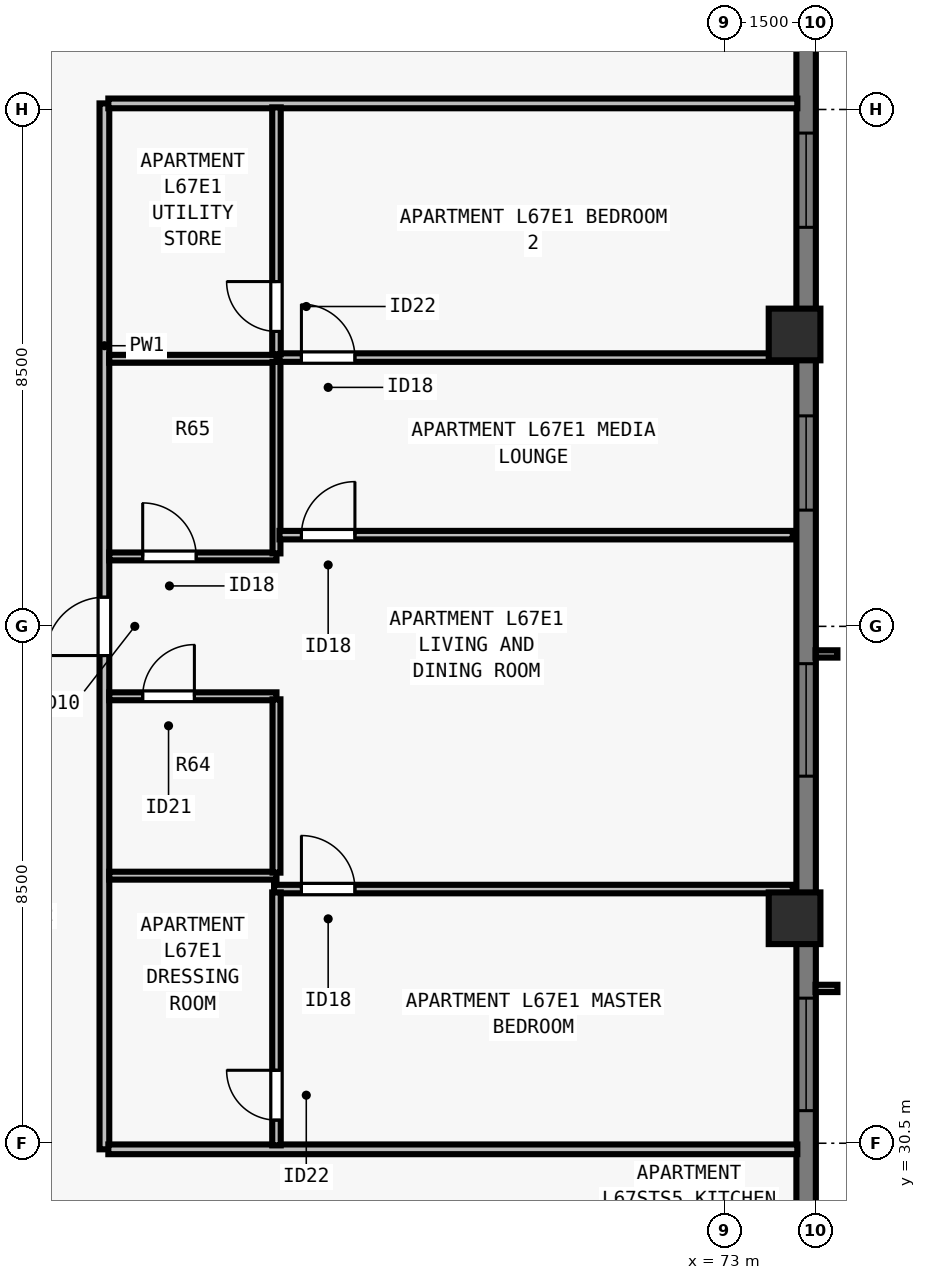
"""IFC4 building model, lengths in metres.
Left out: names, types, materials, properties, quantities, classifications, styles, units other than length and angle.
Written with IfcOpenShell. Run it as: python <this file> out.ifc"""

import sys

from ifc_helpers import new_model, si_unit, direction, frame, frame_2d, origin, origin_2d, place, context, subcontext, project, spatial, rectangle, extrude, element, fill, save


model = new_model("IFC4")
c1 = context("Model", 3, precision=1e-05, world=origin(), true_north=direction((0.0, 1.0)))
c2 = subcontext(c1, "Body", "Model", "MODEL_VIEW")
j1 = project(units=[si_unit("LENGTHUNIT", "METRE"), si_unit("PLANEANGLEUNIT", "RADIAN")], contexts=[c1])
p1 = place(None, origin())
s1 = spatial("IfcSite", under=j1, at=p1, CompositionType="ELEMENT")
p2 = place(p1, origin())
s2 = spatial("IfcBuilding", under=s1, at=p2, CompositionType="ELEMENT")
p3 = place(p2, frame((0.0, 0.0, 244.5)))
s3 = spatial("IfcBuildingStorey", under=s2, at=p3, CompositionType="ELEMENT", Elevation=244.5)
for number, where, z_axis, x_axis in (
    (1, (74.15, 34.2, 0.0), (0.0, 0.0, 1.0), (0.0, 1.0, 0.0)),
    (2, (74.15, 43.8, 0.0), (0.0, 0.0, 1.0), (0.0, 1.0, 0.0)),
):
    element("IfcColumn", number, at=place(p3, frame(where, z_axis=z_axis, x_axis=x_axis)), inside=s3, PredefinedType="COLUMN", context=c2, shape_type="SweptSolid", body=[
        extrude(rectangle(XDim=0.85, YDim=0.85, at=origin_2d()), origin(), (0.0, 0.0, 1.0), 3.5),
    ])
p4 = place(p3, frame((74.34, 56.5, 0.0), z_axis=(0.0, 0.0, 1.0), x_axis=(0.0, -1.0, 0.0)))
e3 = element("IfcWall", 3, at=p4, inside=s3, PredefinedType="SOLIDWALL", context=c2, shape_type="SweptSolid", body=[
    extrude(rectangle(XDim=34.702, YDim=0.32, at=frame_2d((17.351, 0.0))), origin(), (0.0, 0.0, 1.0), 3.29),
])
p5 = place(p4, frame((9.388, 0.0, 0.8)))
e4 = element("IfcOpeningElement", 4, at=p5, cuts=e3, PredefinedType="OPENING", context=c2, shape_type="SweptSolid", body=[
    extrude(rectangle(XDim=1.55, YDim=1.678, at=frame_2d((0.775, 0.839))), frame((0.0, 0.17, 0.0), z_axis=(0.0, -1.0, 0.0), x_axis=(1.0, 0.0, 0.0)), (0.0, 0.0, 1.0), 0.34),
])
p6 = place(p4, frame((14.038, 0.0, 0.8)))
e5 = element("IfcOpeningElement", 5, at=p6, cuts=e3, PredefinedType="OPENING", context=c2, shape_type="SweptSolid", body=[
    extrude(rectangle(XDim=1.55, YDim=1.678, at=frame_2d((0.775, 0.839))), frame((0.0, 0.17, 0.0), z_axis=(0.0, -1.0, 0.0), x_axis=(1.0, 0.0, 0.0)), (0.0, 0.0, 1.0), 0.34),
])
p7 = place(p4, frame((18.114, 0.0, 0.8)))
e6 = element("IfcOpeningElement", 6, at=p7, cuts=e3, PredefinedType="OPENING", context=c2, shape_type="SweptSolid", body=[
    extrude(rectangle(XDim=1.85, YDim=1.678, at=frame_2d((0.925, 0.839))), frame((0.0, 0.17, 0.0), z_axis=(0.0, -1.0, 0.0), x_axis=(1.0, 0.0, 0.0)), (0.0, 0.0, 1.0), 0.34),
])
p8 = place(p4, frame((23.614, 0.0, 0.8)))
e7 = element("IfcOpeningElement", 7, at=p8, cuts=e3, PredefinedType="OPENING", context=c2, shape_type="SweptSolid", body=[
    extrude(rectangle(XDim=1.85, YDim=1.678, at=frame_2d((0.925, 0.839))), frame((0.0, 0.17, 0.0), z_axis=(0.0, -1.0, 0.0), x_axis=(1.0, 0.0, 0.0)), (0.0, 0.0, 1.0), 0.34),
])
p9 = place(p4, frame((30.95, 0.0, 0.8)))
e8 = element("IfcOpeningElement", 8, at=p9, cuts=e3, PredefinedType="OPENING", context=c2, shape_type="SweptSolid", body=[
    extrude(rectangle(XDim=0.9, YDim=1.678, at=frame_2d((0.45, 0.839))), frame((0.0, 0.17, 0.0), z_axis=(0.0, -1.0, 0.0), x_axis=(1.0, 0.0, 0.0)), (0.0, 0.0, 1.0), 0.34),
])
p10 = place(p3, frame((62.8, 30.4, 0.0), z_axis=(0.0, 0.0, 1.0), x_axis=(0.0, 1.0, 0.0)))
e9 = element("IfcWall", 9, at=p10, inside=s3, PredefinedType="PARTITIONING", context=c2, shape_type="SweptSolid", body=[
    extrude(rectangle(XDim=17.2, YDim=0.16, at=frame_2d((8.6, 0.0))), origin(), (0.0, 0.0, 1.0), 3.29),
])
p11 = place(p10, frame((8.12, 0.0, 0.0)))
e10 = element("IfcOpeningElement", 10, at=p11, cuts=e9, PredefinedType="OPENING", context=c2, shape_type="SweptSolid", body=[
    extrude(rectangle(XDim=0.96, YDim=2.18, at=frame_2d((0.48, 1.09))), frame((0.0, 0.09, 0.0), z_axis=(0.0, -1.0, 0.0), x_axis=(1.0, 0.0, 0.0)), (0.0, 0.0, 1.0), 0.18),
])
for number, where, z_axis, x_axis in (
    (11, (62.865, 30.4, 0.0), (0.0, 0.0, 1.0), (1.0, 0.0, 0.0)),
    (12, (62.865, 47.6, 0.0), (0.0, 0.0, 1.0), (1.0, 0.0, 0.0)),
):
    element("IfcWall", number, at=place(p3, frame(where, z_axis=z_axis, x_axis=x_axis)), inside=s3, PredefinedType="PARTITIONING", context=c2, shape_type="SweptSolid", body=[
        extrude(rectangle(XDim=11.33, YDim=0.16, at=frame_2d((5.665, 0.0))), origin(), (0.0, 0.0, 1.0), 3.29),
    ])
p12 = place(p3, frame((62.88, 34.9, 0.0), z_axis=(0.0, 0.0, 1.0), x_axis=(1.0, 0.0, 0.0)))
e13 = element("IfcWall", 13, at=p12, inside=s3, PredefinedType="PLUMBINGWALL", context=c2, shape_type="SweptSolid", body=[
    extrude(rectangle(XDim=2.75, YDim=0.13, at=frame_2d((1.375, 0.0))), origin(), (0.0, 0.0, 1.0), 3.29),
])
p13 = place(p3, frame((62.88, 37.85, 0.0), z_axis=(0.0, 0.0, 1.0), x_axis=(1.0, 0.0, 0.0)))
e14 = element("IfcWall", 14, at=p13, inside=s3, PredefinedType="PLUMBINGWALL", context=c2, shape_type="SweptSolid", body=[
    extrude(rectangle(XDim=2.75, YDim=0.13, at=frame_2d((1.375, 0.0))), origin(), (0.0, 0.0, 1.0), 3.29),
])
p14 = place(p13, frame((0.55, 0.0, 0.0)))
e15 = element("IfcOpeningElement", 15, at=p14, cuts=e14, PredefinedType="OPENING", context=c2, shape_type="SweptSolid", body=[
    extrude(rectangle(XDim=0.85, YDim=2.08, at=frame_2d((0.425, 1.04))), frame((0.0, 0.075, 0.0), z_axis=(0.0, -1.0, 0.0), x_axis=(1.0, 0.0, 0.0)), (0.0, 0.0, 1.0), 0.15),
])
p15 = place(p3, frame((65.63, 34.95, 0.0), z_axis=(0.0, 0.0, 1.0), x_axis=(0.0, 1.0, 0.0)))
e16 = element("IfcWall", 16, at=p15, inside=s3, PredefinedType="PLUMBINGWALL", context=c2, shape_type="SweptSolid", body=[
    extrude(rectangle(XDim=2.85, YDim=0.13, at=frame_2d((1.425, 0.0))), origin(), (0.0, 0.0, 1.0), 3.29),
])
p16 = place(p3, frame((62.88, 43.4, 0.0), z_axis=(0.0, 0.0, 1.0), x_axis=(1.0, 0.0, 0.0)))
e17 = element("IfcWall", 17, at=p16, inside=s3, PredefinedType="PLUMBINGWALL", context=c2, shape_type="SweptSolid", body=[
    extrude(rectangle(XDim=2.75, YDim=0.13, at=frame_2d((1.375, 0.0))), origin(), (0.0, 0.0, 1.0), 3.29),
])
p17 = place(p3, frame((62.88, 40.15, 0.0), z_axis=(0.0, 0.0, 1.0), x_axis=(1.0, 0.0, 0.0)))
e18 = element("IfcWall", 18, at=p17, inside=s3, PredefinedType="PLUMBINGWALL", context=c2, shape_type="SweptSolid", body=[
    extrude(rectangle(XDim=2.75, YDim=0.13, at=frame_2d((1.375, 0.0))), origin(), (0.0, 0.0, 1.0), 3.29),
])
p18 = place(p17, frame((0.55, 0.0, 0.0)))
e19 = element("IfcOpeningElement", 19, at=p18, cuts=e18, PredefinedType="OPENING", context=c2, shape_type="SweptSolid", body=[
    extrude(rectangle(XDim=0.88, YDim=2.1, at=frame_2d((0.44, 1.05))), frame((0.0, 0.075, 0.0), z_axis=(0.0, -1.0, 0.0), x_axis=(1.0, 0.0, 0.0)), (0.0, 0.0, 1.0), 0.15),
])
p19 = place(p3, frame((65.63, 40.2, 0.0), z_axis=(0.0, 0.0, 1.0), x_axis=(0.0, 1.0, 0.0)))
e20 = element("IfcWall", 20, at=p19, inside=s3, PredefinedType="PLUMBINGWALL", context=c2, shape_type="SweptSolid", body=[
    extrude(rectangle(XDim=3.15, YDim=0.13, at=frame_2d((1.575, 0.0))), origin(), (0.0, 0.0, 1.0), 3.29),
])
p20 = place(p3, frame((65.59, 34.68, 0.0), z_axis=(0.0, 0.0, 1.0), x_axis=(1.0, 0.0, 0.0)))
e21 = element("IfcWall", 21, at=p20, inside=s3, PredefinedType="PARTITIONING", context=c2, shape_type="SweptSolid", body=[
    extrude(rectangle(XDim=8.53, YDim=0.14, at=frame_2d((4.265, 0.0))), origin(), (0.0, 0.0, 1.0), 3.29),
])
p21 = place(p20, frame((0.45, 0.0, 0.0)))
e22 = element("IfcOpeningElement", 22, at=p21, cuts=e21, PredefinedType="OPENING", context=c2, shape_type="SweptSolid", body=[
    extrude(rectangle(XDim=0.88, YDim=2.1, at=frame_2d((0.44, 1.05))), frame((0.0, 0.08, 0.0), z_axis=(0.0, -1.0, 0.0), x_axis=(1.0, 0.0, 0.0)), (0.0, 0.0, 1.0), 0.16),
])
p22 = place(p3, frame((65.63, 30.465, 0.0), z_axis=(0.0, 0.0, 1.0), x_axis=(0.0, 1.0, 0.0)))
e23 = element("IfcWall", 23, at=p22, inside=s3, PredefinedType="PARTITIONING", context=c2, shape_type="SweptSolid", body=[
    extrude(rectangle(XDim=4.16, YDim=0.14, at=frame_2d((2.08, 0.0))), origin(), (0.0, 0.0, 1.0), 3.29),
])
p23 = place(p22, frame((0.415, 0.0, 0.0)))
e24 = element("IfcOpeningElement", 24, at=p23, cuts=e23, PredefinedType="OPENING", context=c2, shape_type="SweptSolid", body=[
    extrude(rectangle(XDim=0.82, YDim=2.1, at=frame_2d((0.41, 1.05))), frame((0.0, 0.08, 0.0), z_axis=(0.0, -1.0, 0.0), x_axis=(1.0, 0.0, 0.0)), (0.0, 0.0, 1.0), 0.16),
])
p24 = place(p3, frame((65.68, 43.42, 0.0), z_axis=(0.0, 0.0, 1.0), x_axis=(1.0, 0.0, 0.0)))
e25 = element("IfcWall", 25, at=p24, inside=s3, PredefinedType="PARTITIONING", context=c2, shape_type="SweptSolid", body=[
    extrude(rectangle(XDim=8.44, YDim=0.14, at=frame_2d((4.22, 0.0))), origin(), (0.0, 0.0, 1.0), 3.29),
])
p25 = place(p24, frame((0.36, 0.0, 0.0)))
e26 = element("IfcOpeningElement", 26, at=p25, cuts=e25, PredefinedType="OPENING", context=c2, shape_type="SweptSolid", body=[
    extrude(rectangle(XDim=0.88, YDim=2.1, at=frame_2d((0.44, 1.05))), frame((0.0, 0.08, 0.0), z_axis=(0.0, -1.0, 0.0), x_axis=(1.0, 0.0, 0.0)), (0.0, 0.0, 1.0), 0.16),
])
p26 = place(p3, frame((65.63, 43.475, 0.0), z_axis=(0.0, 0.0, 1.0), x_axis=(0.0, 1.0, 0.0)))
e27 = element("IfcWall", 27, at=p26, inside=s3, PredefinedType="PARTITIONING", context=c2, shape_type="SweptSolid", body=[
    extrude(rectangle(XDim=4.06, YDim=0.14, at=frame_2d((2.03, 0.0))), origin(), (0.0, 0.0, 1.0), 3.29),
])
p27 = place(p26, frame((0.375, 0.0, 0.0)))
e28 = element("IfcOpeningElement", 28, at=p27, cuts=e27, PredefinedType="OPENING", context=c2, shape_type="SweptSolid", body=[
    extrude(rectangle(XDim=0.82, YDim=2.1, at=frame_2d((0.41, 1.05))), frame((0.0, 0.08, 0.0), z_axis=(0.0, -1.0, 0.0), x_axis=(1.0, 0.0, 0.0)), (0.0, 0.0, 1.0), 0.16),
])
p28 = place(p3, frame((65.68, 40.5, 0.0), z_axis=(0.0, 0.0, 1.0), x_axis=(1.0, 0.0, 0.0)))
e29 = element("IfcWall", 29, at=p28, inside=s3, PredefinedType="PARTITIONING", context=c2, shape_type="SweptSolid", body=[
    extrude(rectangle(XDim=8.44, YDim=0.14, at=frame_2d((4.22, 0.0))), origin(), (0.0, 0.0, 1.0), 3.29),
])
p29 = place(p28, frame((0.36, 0.0, 0.0)))
e30 = element("IfcOpeningElement", 30, at=p29, cuts=e29, PredefinedType="OPENING", context=c2, shape_type="SweptSolid", body=[
    extrude(rectangle(XDim=0.88, YDim=2.1, at=frame_2d((0.44, 1.05))), frame((0.0, 0.08, 0.0), z_axis=(0.0, -1.0, 0.0), x_axis=(1.0, 0.0, 0.0)), (0.0, 0.0, 1.0), 0.16),
])
p30 = place(p5, origin())
e31 = element("IfcWindow", 31, at=p30, inside=s3, PartitioningType="SINGLE_PANEL", PredefinedType="WINDOW", context=c2, shape_type="SweptSolid", body=[
    extrude(rectangle(XDim=1.55, YDim=1.678, at=frame_2d((0.775, 0.839))), frame((0.0, -0.05, 0.0), z_axis=(0.0, -1.0, 0.0), x_axis=(1.0, 0.0, 0.0)), (0.0, 0.0, 1.0), 0.06),
])
fill(e4, e31)
p31 = place(p6, origin())
e32 = element("IfcWindow", 32, at=p31, inside=s3, PartitioningType="SINGLE_PANEL", PredefinedType="WINDOW", context=c2, shape_type="SweptSolid", body=[
    extrude(rectangle(XDim=1.55, YDim=1.678, at=frame_2d((0.775, 0.839))), frame((0.0, -0.05, 0.0), z_axis=(0.0, -1.0, 0.0), x_axis=(1.0, 0.0, 0.0)), (0.0, 0.0, 1.0), 0.06),
])
fill(e5, e32)
p32 = place(p7, origin())
e33 = element("IfcWindow", 33, at=p32, inside=s3, PartitioningType="SINGLE_PANEL", PredefinedType="WINDOW", context=c2, shape_type="SweptSolid", body=[
    extrude(rectangle(XDim=1.85, YDim=1.678, at=frame_2d((0.925, 0.839))), frame((0.0, -0.05, 0.0), z_axis=(0.0, -1.0, 0.0), x_axis=(1.0, 0.0, 0.0)), (0.0, 0.0, 1.0), 0.06),
])
fill(e6, e33)
p33 = place(p8, origin())
e34 = element("IfcWindow", 34, at=p33, inside=s3, PartitioningType="SINGLE_PANEL", PredefinedType="WINDOW", context=c2, shape_type="SweptSolid", body=[
    extrude(rectangle(XDim=1.85, YDim=1.678, at=frame_2d((0.925, 0.839))), frame((0.0, -0.05, 0.0), z_axis=(0.0, -1.0, 0.0), x_axis=(1.0, 0.0, 0.0)), (0.0, 0.0, 1.0), 0.06),
])
fill(e7, e34)
p34 = place(p14, origin())
e35 = element("IfcDoor", 35, at=p34, inside=s3, OperationType="SINGLE_SWING_RIGHT", PredefinedType="DOOR", context=c2, shape_type="SweptSolid", body=[
    extrude(rectangle(XDim=0.85, YDim=2.08, at=frame_2d((0.425, 1.04))), frame((0.0, 0.025, 0.0), z_axis=(0.0, -1.0, 0.0), x_axis=(1.0, 0.0, 0.0)), (0.0, 0.0, 1.0), 0.05),
])
fill(e15, e35)
p35 = place(p18, origin())
e36 = element("IfcDoor", 36, at=p35, inside=s3, OperationType="SINGLE_SWING_LEFT", PredefinedType="DOOR", context=c2, shape_type="SweptSolid", body=[
    extrude(rectangle(XDim=0.88, YDim=2.1, at=frame_2d((0.44, 1.05))), frame((0.0, 0.025, 0.0), z_axis=(0.0, -1.0, 0.0), x_axis=(1.0, 0.0, 0.0)), (0.0, 0.0, 1.0), 0.05),
])
fill(e19, e36)
p36 = place(p23, origin())
e37 = element("IfcDoor", 37, at=p36, inside=s3, OperationType="SINGLE_SWING_RIGHT", PredefinedType="DOOR", context=c2, shape_type="SweptSolid", body=[
    extrude(rectangle(XDim=0.82, YDim=2.1, at=frame_2d((0.41, 1.05))), frame((0.0, 0.025, 0.0), z_axis=(0.0, -1.0, 0.0), x_axis=(1.0, 0.0, 0.0)), (0.0, 0.0, 1.0), 0.05),
])
fill(e24, e37)
p37 = place(p21, origin())
e38 = element("IfcDoor", 38, at=p37, inside=s3, OperationType="SINGLE_SWING_LEFT", PredefinedType="DOOR", context=c2, shape_type="SweptSolid", body=[
    extrude(rectangle(XDim=0.88, YDim=2.1, at=frame_2d((0.44, 1.05))), frame((0.0, 0.025, 0.0), z_axis=(0.0, -1.0, 0.0), x_axis=(1.0, 0.0, 0.0)), (0.0, 0.0, 1.0), 0.05),
])
fill(e22, e38)
p38 = place(p27, origin())
e39 = element("IfcDoor", 39, at=p38, inside=s3, OperationType="SINGLE_SWING_RIGHT", PredefinedType="DOOR", context=c2, shape_type="SweptSolid", body=[
    extrude(rectangle(XDim=0.82, YDim=2.1, at=frame_2d((0.41, 1.05))), frame((0.0, 0.025, 0.0), z_axis=(0.0, -1.0, 0.0), x_axis=(1.0, 0.0, 0.0)), (0.0, 0.0, 1.0), 0.05),
])
fill(e28, e39)
p39 = place(p25, origin())
e40 = element("IfcDoor", 40, at=p39, inside=s3, OperationType="SINGLE_SWING_LEFT", PredefinedType="DOOR", context=c2, shape_type="SweptSolid", body=[
    extrude(rectangle(XDim=0.88, YDim=2.1, at=frame_2d((0.44, 1.05))), frame((0.0, 0.025, 0.0), z_axis=(0.0, -1.0, 0.0), x_axis=(1.0, 0.0, 0.0)), (0.0, 0.0, 1.0), 0.05),
])
fill(e26, e40)
p40 = place(p29, origin())
e41 = element("IfcDoor", 41, at=p40, inside=s3, OperationType="SINGLE_SWING_RIGHT", PredefinedType="DOOR", context=c2, shape_type="SweptSolid", body=[
    extrude(rectangle(XDim=0.88, YDim=2.1, at=frame_2d((0.44, 1.05))), frame((0.0, 0.025, 0.0), z_axis=(0.0, -1.0, 0.0), x_axis=(1.0, 0.0, 0.0)), (0.0, 0.0, 1.0), 0.05),
])
fill(e30, e41)
p41 = place(p11, origin())
e42 = element("IfcDoor", 42, at=p41, inside=s3, OperationType="SINGLE_SWING_LEFT", PredefinedType="DOOR", context=c2, shape_type="SweptSolid", body=[
    extrude(rectangle(XDim=0.96, YDim=2.18, at=frame_2d((0.48, 1.09))), frame((0.0, 0.025, 0.0), z_axis=(0.0, -1.0, 0.0), x_axis=(1.0, 0.0, 0.0)), (0.0, 0.0, 1.0), 0.05),
])
fill(e10, e42)
save(model, sys.argv[1])
